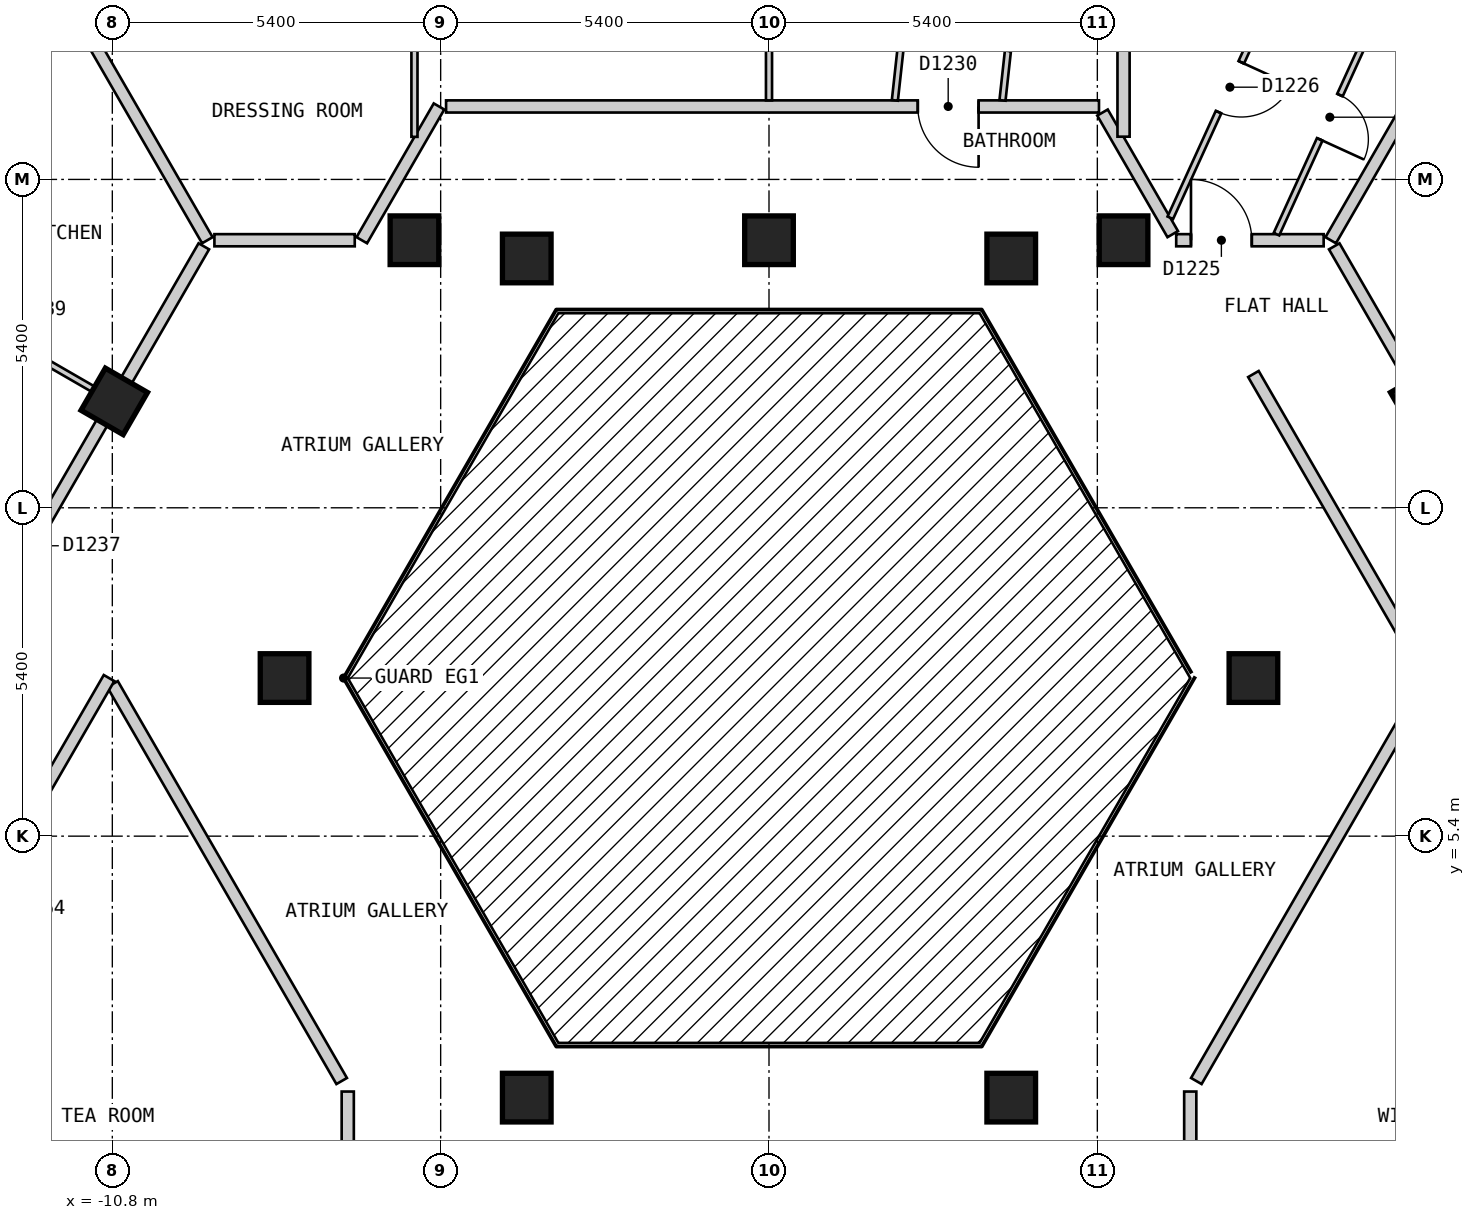
"""IFC4 building model, lengths in metres.
Left out: names, types, materials, properties, quantities, classifications, styles, units other than length and angle.
Written with IfcOpenShell. Run it as: python <this file> out.ifc"""

import sys

from ifc_helpers import new_model, si_unit, direction, frame, frame_2d, origin, origin_2d, place, context, subcontext, project, spatial, rectangle, extrude, element, fill, save


model = new_model("IFC4")
c1 = context("Model", 3, precision=1e-05, world=origin(), true_north=direction((0.0, 1.0)))
c2 = subcontext(c1, "Body", "Model", "MODEL_VIEW")
j1 = project(units=[si_unit("LENGTHUNIT", "METRE"), si_unit("PLANEANGLEUNIT", "RADIAN")], contexts=[c1])
p1 = place(None, origin())
s1 = spatial("IfcSite", under=j1, at=p1, CompositionType="ELEMENT")
p2 = place(p1, origin())
s2 = spatial("IfcBuilding", under=s1, at=p2, CompositionType="ELEMENT")
p3 = place(p2, frame((0.0, 0.0, 117.6)))
s3 = spatial("IfcBuildingStorey", under=s2, at=p3, CompositionType="ELEMENT", Elevation=117.6)
for number, where, z_axis, x_axis in (
    (1, (3.984, 1.1, 0.0), (0.0, 0.0, 1.0), (1.0, 0.0, 0.0)),
    (2, (7.967, 8.0, 0.0), (0.0, 0.0, 1.0), (1.0, 0.0, 0.0)),
    (3, (10.768, 12.55, 0.0), (0.0, 0.0, 1.0), (-0.5, 0.866, 0.0)),
    (4, (5.831, 15.2, 0.0), (0.0, 0.0, 1.0), (-1.0, 0.0, 0.0)),
    (5, (3.984, 14.9, 0.0), (0.0, 0.0, 1.0), (1.0, 0.0, 0.0)),
    (6, (0.0, 15.2, 0.0), (0.0, 0.0, 1.0), (-1.0, 0.0, 0.0)),
    (7, (-3.984, 14.9, 0.0), (0.0, 0.0, 1.0), (1.0, 0.0, 0.0)),
    (8, (-5.831, 15.2, 0.0), (0.0, 0.0, 1.0), (-1.0, 0.0, 0.0)),
    (9, (-10.768, 12.55, 0.0), (0.0, 0.0, 1.0), (-0.5, -0.866, 0.0)),
    (10, (-7.967, 8.0, 0.0), (0.0, 0.0, 1.0), (1.0, 0.0, 0.0)),
    (11, (-3.984, 1.1, 0.0), (0.0, 0.0, 1.0), (1.0, 0.0, 0.0)),
):
    element("IfcColumn", number, at=place(p3, frame(where, z_axis=z_axis, x_axis=x_axis)), inside=s3, PredefinedType="COLUMN", context=c2, shape_type="SweptSolid", body=[
        extrude(rectangle(XDim=0.8, YDim=0.8, at=origin_2d()), origin(), (0.0, 0.0, 1.0), 3.0),
    ])
p4 = place(p3, frame((-10.796, 7.9, 0.0), z_axis=(0.0, 0.0, 1.0), x_axis=(0.499954271211, -0.866051803703, 0.0)))
e12 = element("IfcWall", 12, at=p4, inside=s3, PredefinedType="PARTITIONING", context=c2, shape_type="SweptSolid", body=[
    extrude(rectangle(XDim=7.536, YDim=0.2, at=frame_2d((3.768, 0.0))), origin(), (0.0, 0.0, 1.0), 2.7),
])
p5 = place(p3, frame((5.485, 17.3, 0.0), z_axis=(0.0, 0.0, 1.0), x_axis=(0.500027479704, -0.866009537788, 0.0)))
e13 = element("IfcWall", 13, at=p5, inside=s3, PredefinedType="PARTITIONING", context=c2, shape_type="SweptSolid", body=[
    extrude(rectangle(XDim=2.309, YDim=0.2, at=frame_2d((1.155, 0.0))), origin(), (0.0, 0.0, 1.0), 2.7),
])
p6 = place(p3, frame((7.967, 13.0, 0.0), z_axis=(0.0, 0.0, 1.0), x_axis=(0.50003774998, -0.866003607726, 0.0)))
e14 = element("IfcWall", 14, at=p6, inside=s3, PredefinedType="PARTITIONING", context=c2, shape_type="SweptSolid", body=[
    extrude(rectangle(XDim=14.433, YDim=0.2, at=frame_2d((7.217, 0.0))), origin(), (0.0, 0.0, 1.0), 2.7),
])
p7 = place(p6, frame((6.824, 0.0, 0.0)))
e15 = element("IfcOpeningElement", 15, at=p7, cuts=e14, PredefinedType="OPENING", context=c2, shape_type="SweptSolid", body=[
    extrude(rectangle(XDim=0.9, YDim=2.1, at=frame_2d((0.45, 1.05))), frame((0.0, 0.11, 0.0), z_axis=(0.0, -1.0, 0.0), x_axis=(1.0, 0.0, 0.0)), (0.0, 0.0, 1.0), 0.22),
])
p8 = place(p3, frame((9.296, 15.1, 0.0), z_axis=(0.0, 0.0, 1.0), x_axis=(0.499974024244, -0.866040400375, 0.0)))
e16 = element("IfcWall", 16, at=p8, inside=s3, PredefinedType="PARTITIONING", context=c2, shape_type="SweptSolid", body=[
    extrude(rectangle(XDim=16.857, YDim=0.2, at=frame_2d((8.429, 0.0))), origin(), (0.0, 0.0, 1.0), 2.7),
])
p9 = place(p8, frame((5.187, 0.0, 0.0)))
e17 = element("IfcOpeningElement", 17, at=p9, cuts=e16, PredefinedType="OPENING", context=c2, shape_type="SweptSolid", body=[
    extrude(rectangle(XDim=1.0, YDim=2.1, at=frame_2d((0.5, 1.05))), frame((0.0, 0.11, 0.0), z_axis=(0.0, -1.0, 0.0), x_axis=(1.0, 0.0, 0.0)), (0.0, 0.0, 1.0), 0.22),
])
p10 = place(p3, frame((-9.121, 15.2, 0.0), z_axis=(0.0, 0.0, 1.0), x_axis=(1.0, 0.0, 0.0)))
e18 = element("IfcWall", 18, at=p10, inside=s3, PredefinedType="PARTITIONING", context=c2, shape_type="SweptSolid", body=[
    extrude(rectangle(XDim=2.308, YDim=0.2, at=frame_2d((1.154, 0.0))), origin(), (0.0, 0.0, 1.0), 2.7),
])
p11 = place(p3, frame((6.697, 15.2, 0.0), z_axis=(0.0, 0.0, 1.0), x_axis=(1.0, 0.0, 0.0)))
e19 = element("IfcWall", 19, at=p11, inside=s3, PredefinedType="PARTITIONING", context=c2, shape_type="SweptSolid", body=[
    extrude(rectangle(XDim=2.425, YDim=0.2, at=frame_2d((1.212, 0.0))), origin(), (0.0, 0.0, 1.0), 2.7),
])
p12 = place(p11, frame((0.243, 0.0, 0.0)))
e20 = element("IfcOpeningElement", 20, at=p12, cuts=e19, PredefinedType="OPENING", context=c2, shape_type="SweptSolid", body=[
    extrude(rectangle(XDim=1.0, YDim=2.1, at=frame_2d((0.5, 1.05))), frame((0.0, 0.11, 0.0), z_axis=(0.0, -1.0, 0.0), x_axis=(1.0, 0.0, 0.0)), (0.0, 0.0, 1.0), 0.22),
])
p13 = place(p3, frame((-5.311, 17.4, 0.0), z_axis=(0.0, 0.0, 1.0), x_axis=(1.0, 0.0, 0.0)))
e21 = element("IfcWall", 21, at=p13, inside=s3, PredefinedType="PARTITIONING", context=c2, shape_type="SweptSolid", body=[
    extrude(rectangle(XDim=10.738, YDim=0.2, at=frame_2d((5.369, 0.0))), origin(), (0.0, 0.0, 1.0), 2.7),
])
p14 = place(p13, frame((7.758, 0.0, 0.0)))
e22 = element("IfcOpeningElement", 22, at=p14, cuts=e21, PredefinedType="OPENING", context=c2, shape_type="SweptSolid", body=[
    extrude(rectangle(XDim=1.0, YDim=2.1, at=frame_2d((0.5, 1.05))), frame((0.0, 0.11, 0.0), z_axis=(0.0, -1.0, 0.0), x_axis=(1.0, 0.0, 0.0)), (0.0, 0.0, 1.0), 0.22),
])
p15 = place(p3, frame((7.028, 1.373, 0.0), z_axis=(0.0, 0.0, 1.0), x_axis=(0.499954271211, 0.866051803703, 0.0)))
e23 = element("IfcWall", 23, at=p15, inside=s3, PredefinedType="PARTITIONING", context=c2, shape_type="SweptSolid", body=[
    extrude(rectangle(XDim=7.536, YDim=0.2, at=frame_2d((3.768, 0.0))), origin(), (0.0, 0.0, 1.0), 2.7),
])
p16 = place(p3, frame((-15.242, 0.399, 0.0), z_axis=(0.0, 0.0, 1.0), x_axis=(0.499953615651, 0.866052182145, 0.0)))
e24 = element("IfcWall", 24, at=p16, inside=s3, PredefinedType="PARTITIONING", context=c2, shape_type="SweptSolid", body=[
    extrude(rectangle(XDim=8.777, YDim=0.2, at=frame_2d((4.388, 0.0))), origin(), (0.0, 0.0, 1.0), 2.7),
])
p17 = place(p16, frame((3.938, 0.0, 0.0)))
e25 = element("IfcOpeningElement", 25, at=p17, cuts=e24, PredefinedType="OPENING", context=c2, shape_type="SweptSolid", body=[
    extrude(rectangle(XDim=0.9, YDim=2.1, at=frame_2d((0.45, 1.05))), frame((0.0, 0.11, 0.0), z_axis=(0.0, -1.0, 0.0), x_axis=(1.0, 0.0, 0.0)), (0.0, 0.0, 1.0), 0.22),
])
p18 = place(p3, frame((-6.697, 15.2, 0.0), z_axis=(0.0, 0.0, 1.0), x_axis=(0.499963722229, 0.866046347752, 0.0)))
e26 = element("IfcWall", 26, at=p18, inside=s3, PredefinedType="PARTITIONING", context=c2, shape_type="SweptSolid", body=[
    extrude(rectangle(XDim=2.54, YDim=0.2, at=frame_2d((1.27, 0.0))), origin(), (0.0, 0.0, 1.0), 2.7),
])
p19 = place(p3, frame((-17.753, 0.45, 0.0), z_axis=(0.0, 0.0, 1.0), x_axis=(0.499988552313, 0.866032013009, 0.0)))
e27 = element("IfcWall", 27, at=p19, inside=s3, PredefinedType="PARTITIONING", context=c2, shape_type="SweptSolid", body=[
    extrude(rectangle(XDim=16.917, YDim=0.2, at=frame_2d((8.458, 0.0))), origin(), (0.0, 0.0, 1.0), 2.7),
])
p20 = place(p19, frame((10.73, 0.0, 0.0)))
e28 = element("IfcOpeningElement", 28, at=p20, cuts=e27, PredefinedType="OPENING", context=c2, shape_type="SweptSolid", body=[
    extrude(rectangle(XDim=1.0, YDim=2.1, at=frame_2d((0.5, 1.05))), frame((0.0, 0.11, 0.0), z_axis=(0.0, -1.0, 0.0), x_axis=(1.0, 0.0, 0.0)), (0.0, 0.0, 1.0), 0.22),
])
p21 = place(p19, frame((0.594, 0.0, 0.0)))
e29 = element("IfcOpeningElement", 29, at=p21, cuts=e27, PredefinedType="OPENING", context=c2, shape_type="SweptSolid", body=[
    extrude(rectangle(XDim=1.0, YDim=2.1, at=frame_2d((0.5, 1.05))), frame((0.0, 0.11, 0.0), z_axis=(0.0, -1.0, 0.0), x_axis=(1.0, 0.0, 0.0)), (0.0, 0.0, 1.0), 0.22),
])
for number, where, z_axis, x_axis in (
    (30, (6.928, -2.8, 0.0), (0.0, 0.0, 1.0), (0.0, 1.0, 0.0)),
    (31, (-6.928, -2.8, 0.0), (0.0, 0.0, 1.0), (0.0, 1.0, 0.0)),
):
    element("IfcWall", number, at=place(p3, frame(where, z_axis=z_axis, x_axis=x_axis)), inside=s3, PredefinedType="PARTITIONING", context=c2, shape_type="SweptSolid", body=[
        extrude(rectangle(XDim=4.0, YDim=0.2, at=frame_2d((2.0, 0.0))), origin(), (0.0, 0.0, 1.0), 2.7),
    ])
p22 = place(p3, frame((0.0, 21.325, 0.0), z_axis=(0.0, 0.0, 1.0), x_axis=(0.0, -1.0, 0.0)))
e32 = element("IfcWall", 32, at=p22, inside=s3, PredefinedType="PARTITIONING", context=c2, shape_type="SweptSolid", body=[
    extrude(rectangle(XDim=3.825, YDim=0.1, at=frame_2d((1.913, 0.0))), origin(), (0.0, 0.0, 1.0), 2.7),
])
p23 = place(p22, frame((1.537, 0.0, 0.0)))
e33 = element("IfcOpeningElement", 33, at=p23, cuts=e32, PredefinedType="OPENING", context=c2, shape_type="SweptSolid", body=[
    extrude(rectangle(XDim=0.8, YDim=2.1, at=frame_2d((0.4, 1.05))), frame((0.0, 0.06, 0.0), z_axis=(0.0, -1.0, 0.0), x_axis=(1.0, 0.0, 0.0)), (0.0, 0.0, 1.0), 0.12),
])
p24 = place(p3, frame((-19.706, 5.16, 0.0), z_axis=(0.0, 0.0, 1.0), x_axis=(0.500003799672, 0.866023210032, 0.0)))
e34 = element("IfcWall", 34, at=p24, inside=s3, PredefinedType="PARTITIONING", context=c2, shape_type="SweptSolid", body=[
    extrude(rectangle(XDim=16.15, YDim=0.1, at=frame_2d((8.075, 0.0))), origin(), (0.0, 0.0, 1.0), 2.7),
])
p25 = place(p24, frame((7.677, 0.0, 0.0)))
e35 = element("IfcOpeningElement", 35, at=p25, cuts=e34, PredefinedType="OPENING", context=c2, shape_type="SweptSolid", body=[
    extrude(rectangle(XDim=0.9, YDim=2.1, at=frame_2d((0.45, 1.05))), frame((0.0, 0.06, 0.0), z_axis=(0.0, -1.0, 0.0), x_axis=(1.0, 0.0, 0.0)), (0.0, 0.0, 1.0), 0.12),
])
p26 = place(p3, frame((8.346, 15.3, 0.0), z_axis=(0.0, 0.0, 1.0), x_axis=(0.415189790387, 0.909734817383, 0.0)))
e36 = element("IfcWall", 36, at=p26, inside=s3, PredefinedType="PARTITIONING", context=c2, shape_type="SweptSolid", body=[
    extrude(rectangle(XDim=4.282, YDim=0.1, at=frame_2d((2.141, 0.0))), origin(), (0.0, 0.0, 1.0), 2.7),
])
p27 = place(p26, frame((1.714, 0.0, 0.0)))
e37 = element("IfcOpeningElement", 37, at=p27, cuts=e36, PredefinedType="OPENING", context=c2, shape_type="SweptSolid", body=[
    extrude(rectangle(XDim=0.8, YDim=2.1, at=frame_2d((0.4, 1.05))), frame((0.0, 0.06, 0.0), z_axis=(0.0, -1.0, 0.0), x_axis=(1.0, 0.0, 0.0)), (0.0, 0.0, 1.0), 0.12),
])
p28 = place(p3, frame((6.6, 15.569, 0.0), z_axis=(0.0, 0.0, 1.0), x_axis=(0.415221636251, 0.909720282718, 0.0)))
e38 = element("IfcWall", 38, at=p28, inside=s3, PredefinedType="PARTITIONING", context=c2, shape_type="SweptSolid", body=[
    extrude(rectangle(XDim=4.783, YDim=0.1, at=frame_2d((2.391, 0.0))), origin(), (0.0, 0.0, 1.0), 2.7),
])
p29 = place(p28, frame((1.911, 0.0, 0.0)))
e39 = element("IfcOpeningElement", 39, at=p29, cuts=e38, PredefinedType="OPENING", context=c2, shape_type="SweptSolid", body=[
    extrude(rectangle(XDim=0.9, YDim=2.1, at=frame_2d((0.45, 1.05))), frame((0.0, 0.06, 0.0), z_axis=(0.0, -1.0, 0.0), x_axis=(1.0, 0.0, 0.0)), (0.0, 0.0, 1.0), 0.12),
])
p30 = place(p3, frame((2.07, 17.5, 0.0), z_axis=(0.0, 0.0, 1.0), x_axis=(0.108970694085, 0.994044962681, 0.0)))
e40 = element("IfcWall", 40, at=p30, inside=s3, PredefinedType="PARTITIONING", context=c2, shape_type="SweptSolid", body=[
    extrude(rectangle(XDim=2.733, YDim=0.1, at=frame_2d((1.367, 0.0))), origin(), (0.0, 0.0, 1.0), 2.7),
])
p31 = place(p30, frame((0.867, 0.0, 0.0)))
e41 = element("IfcOpeningElement", 41, at=p31, cuts=e40, PredefinedType="OPENING", context=c2, shape_type="SweptSolid", body=[
    extrude(rectangle(XDim=0.9, YDim=2.1, at=frame_2d((0.45, 1.05))), frame((0.0, 0.06, 0.0), z_axis=(0.0, -1.0, 0.0), x_axis=(1.0, 0.0, 0.0)), (0.0, 0.0, 1.0), 0.12),
])
p32 = place(p3, frame((3.84, 17.5, 0.0), z_axis=(0.0, 0.0, 1.0), x_axis=(0.109141067014, 0.994026271027, 0.0)))
e42 = element("IfcWall", 42, at=p32, inside=s3, PredefinedType="PARTITIONING", context=c2, shape_type="SweptSolid", body=[
    extrude(rectangle(XDim=2.492, YDim=0.1, at=frame_2d((1.246, 0.0))), origin(), (0.0, 0.0, 1.0), 2.7),
])
p33 = place(p32, frame((0.82, 0.0, 0.0)))
e43 = element("IfcOpeningElement", 43, at=p33, cuts=e42, PredefinedType="OPENING", context=c2, shape_type="SweptSolid", body=[
    extrude(rectangle(XDim=0.8, YDim=2.1, at=frame_2d((0.4, 1.05))), frame((0.0, 0.06, 0.0), z_axis=(0.0, -1.0, 0.0), x_axis=(1.0, 0.0, 0.0)), (0.0, 0.0, 1.0), 0.12),
])
p34 = place(p3, frame((-5.831, 16.9, 0.0), z_axis=(0.0, 0.0, 1.0), x_axis=(0.0, 1.0, 0.0)))
e44 = element("IfcWall", 44, at=p34, inside=s3, PredefinedType="PARTITIONING", context=c2, shape_type="SweptSolid", body=[
    extrude(rectangle(XDim=8.4, YDim=0.1, at=frame_2d((4.2, 0.0))), origin(), (0.0, 0.0, 1.0), 2.7),
])
p35 = place(p34, frame((5.977, 0.0, 0.0)))
e45 = element("IfcOpeningElement", 45, at=p35, cuts=e44, PredefinedType="OPENING", context=c2, shape_type="SweptSolid", body=[
    extrude(rectangle(XDim=0.9, YDim=2.1, at=frame_2d((0.45, 1.05))), frame((0.0, 0.06, 0.0), z_axis=(0.0, -1.0, 0.0), x_axis=(1.0, 0.0, 0.0)), (0.0, 0.0, 1.0), 0.12),
])
p36 = place(p3, frame((-11.52, 19.155, 0.0), z_axis=(0.0, 0.0, 1.0), x_axis=(0.499916824138, -0.866073420066, 0.0)))
e46 = element("IfcWall", 46, at=p36, inside=s3, PredefinedType="PARTITIONING", context=c2, shape_type="SweptSolid", body=[
    extrude(rectangle(XDim=4.567, YDim=0.2, at=frame_2d((2.283, 0.0))), origin(), (0.0, 0.0, 1.0), 2.7),
])
p37 = place(p3, frame((9.238, 15.2, 0.0), z_axis=(0.0, 0.0, 1.0), x_axis=(0.499890453443, 0.866088641281, 0.0)))
e47 = element("IfcWall", 47, at=p37, inside=s3, PredefinedType="PARTITIONING", context=c2, shape_type="SweptSolid", body=[
    extrude(rectangle(XDim=4.487, YDim=0.2, at=frame_2d((2.243, 0.0))), origin(), (0.0, 0.0, 1.0), 2.7),
])
p38 = place(p3, frame((5.831, 16.903, 0.0), z_axis=(0.0, 0.0, 1.0), x_axis=(0.0, 1.0, 0.0)))
e48 = element("IfcWall", 48, at=p38, inside=s3, PredefinedType="PARTITIONING", context=c2, shape_type="SweptSolid", body=[
    extrude(rectangle(XDim=8.397, YDim=0.2, at=frame_2d((4.198, 0.0))), origin(), (0.0, 0.0, 1.0), 2.7),
])
p39 = place(p3, frame((-14.271, 14.573, 0.0), z_axis=(0.0, 0.0, 1.0), x_axis=(0.866014535457, -0.500018824023, 0.0)))
e49 = element("IfcWall", 49, at=p39, inside=s3, PredefinedType="PARTITIONING", context=c2, shape_type="SweptSolid", body=[
    extrude(rectangle(XDim=3.946, YDim=0.1, at=frame_2d((1.973, 0.0))), origin(), (0.0, 0.0, 1.0), 2.7),
])
p40 = place(p39, frame((1.574, 0.0, 0.0)))
e50 = element("IfcOpeningElement", 50, at=p40, cuts=e49, PredefinedType="OPENING", context=c2, shape_type="SweptSolid", body=[
    extrude(rectangle(XDim=0.9, YDim=2.1, at=frame_2d((0.45, 1.05))), frame((0.0, 0.06, 0.0), z_axis=(0.0, -1.0, 0.0), x_axis=(1.0, 0.0, 0.0)), (0.0, 0.0, 1.0), 0.12),
])
p41 = place(p12, origin())
e51 = element("IfcDoor", 51, at=p41, inside=s3, OperationType="SINGLE_SWING_LEFT", PredefinedType="DOOR", context=c2, shape_type="SweptSolid", body=[
    extrude(rectangle(XDim=1.0, YDim=2.1, at=frame_2d((0.5, 1.05))), frame((0.0, 0.025, 0.0), z_axis=(0.0, -1.0, 0.0), x_axis=(1.0, 0.0, 0.0)), (0.0, 0.0, 1.0), 0.05),
])
fill(e20, e51)
p42 = place(p29, origin())
e52 = element("IfcDoor", 52, at=p42, inside=s3, OperationType="SINGLE_SWING_RIGHT", PredefinedType="DOOR", context=c2, shape_type="SweptSolid", body=[
    extrude(rectangle(XDim=0.9, YDim=2.1, at=frame_2d((0.45, 1.05))), frame((0.0, 0.025, 0.0), z_axis=(0.0, -1.0, 0.0), x_axis=(1.0, 0.0, 0.0)), (0.0, 0.0, 1.0), 0.05),
])
fill(e39, e52)
p43 = place(p27, origin())
e53 = element("IfcDoor", 53, at=p43, inside=s3, OperationType="SINGLE_SWING_LEFT", PredefinedType="DOOR", context=c2, shape_type="SweptSolid", body=[
    extrude(rectangle(XDim=0.8, YDim=2.1, at=frame_2d((0.4, 1.05))), frame((0.0, 0.025, 0.0), z_axis=(0.0, -1.0, 0.0), x_axis=(1.0, 0.0, 0.0)), (0.0, 0.0, 1.0), 0.05),
])
fill(e37, e53)
p44 = place(p14, origin())
e54 = element("IfcDoor", 54, at=p44, inside=s3, OperationType="SINGLE_SWING_RIGHT", PredefinedType="DOOR", context=c2, shape_type="SweptSolid", body=[
    extrude(rectangle(XDim=1.0, YDim=2.1, at=frame_2d((0.5, 1.05))), frame((0.0, 0.025, 0.0), z_axis=(0.0, -1.0, 0.0), x_axis=(1.0, 0.0, 0.0)), (0.0, 0.0, 1.0), 0.05),
])
fill(e22, e54)
save(model, sys.argv[1])
